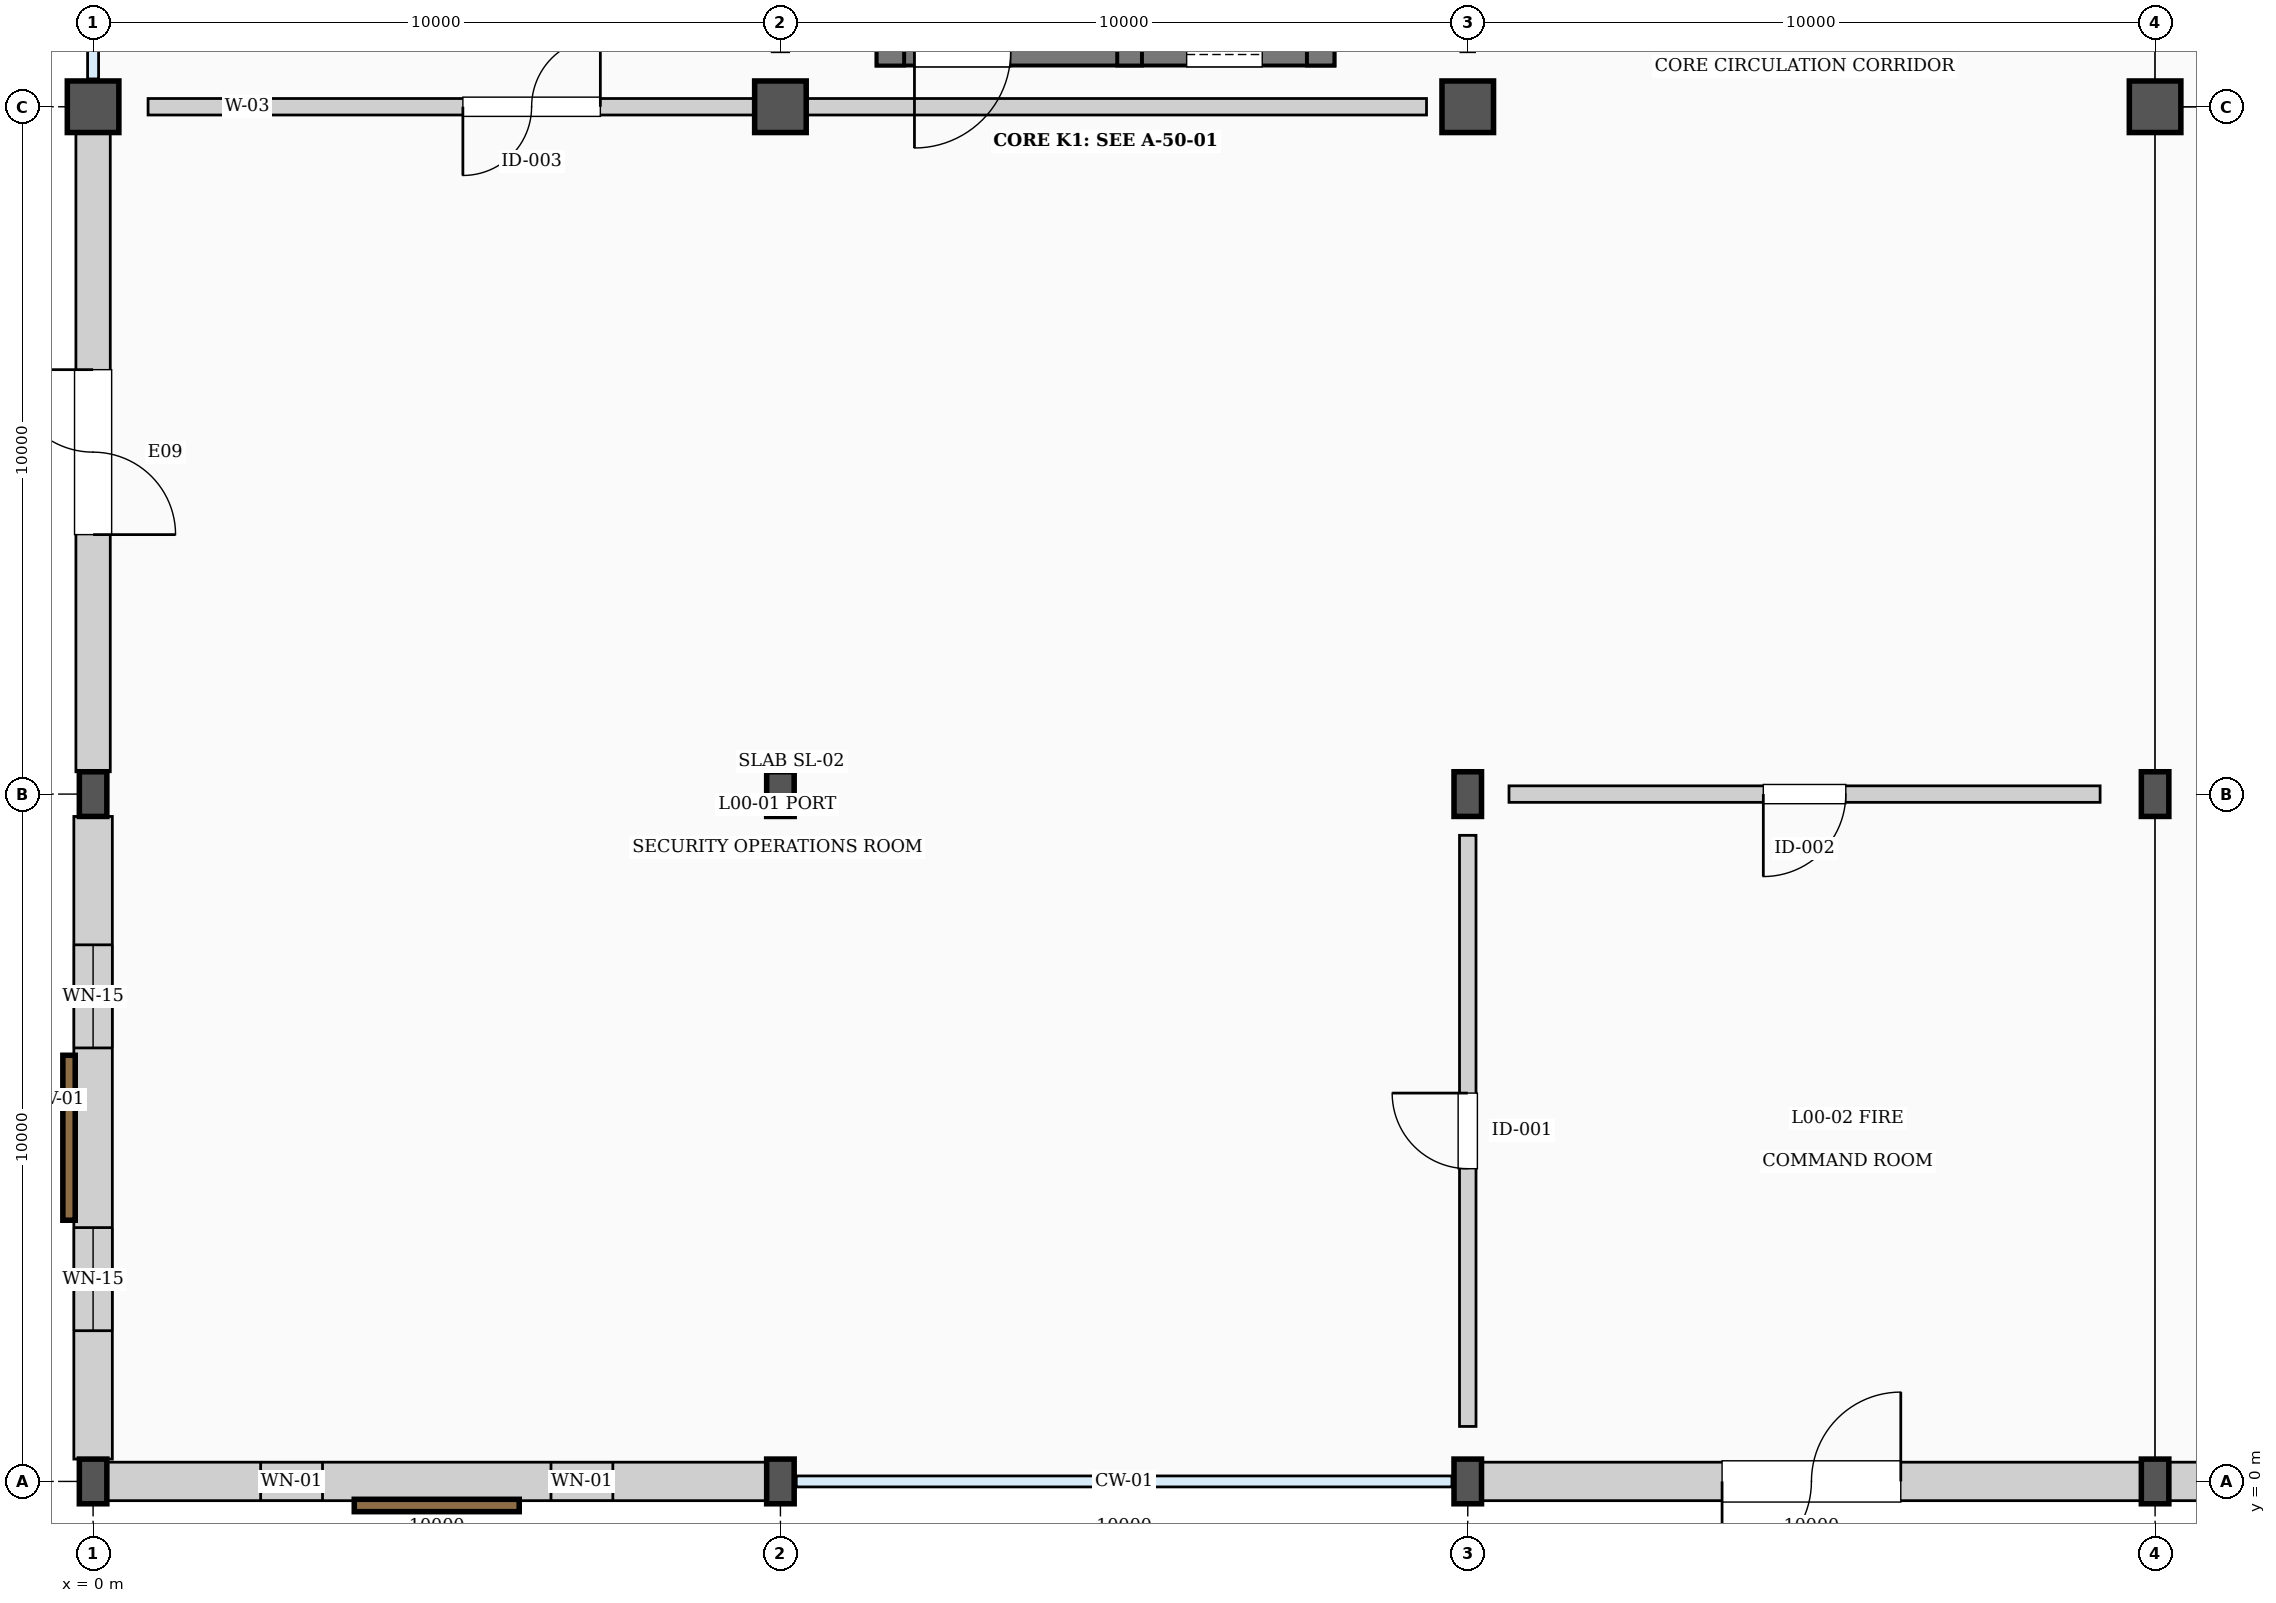
"""IFC4 building model, lengths in metres.
Left out: names, types, materials, properties, quantities, classifications, styles, units other than length and angle.
Written with IfcOpenShell. Run it as: python <this file> out.ifc"""

import sys

from ifc_helpers import new_model, si_unit, direction, frame, frame_2d, origin, origin_2d, place, context, subcontext, project, spatial, rectangle, extrude, element, fill, save


model = new_model("IFC4")
c1 = context("Model", 3, precision=1e-05, world=origin(), true_north=direction((0.0, 1.0)))
c2 = subcontext(c1, "Body", "Model", "MODEL_VIEW")
j1 = project(units=[si_unit("LENGTHUNIT", "METRE"), si_unit("PLANEANGLEUNIT", "RADIAN")], contexts=[c1])
p1 = place(None, origin())
s1 = spatial("IfcSite", under=j1, at=p1, CompositionType="ELEMENT")
p2 = place(p1, origin())
s2 = spatial("IfcBuilding", under=s1, at=p2, CompositionType="ELEMENT")
p3 = place(p2, origin())
s3 = spatial("IfcBuildingStorey", under=s2, at=p3, CompositionType="ELEMENT", Elevation=0.0)
for number, where, z_axis, x_axis in (
    (1, (0.0, 0.0, 0.0), (0.0, 0.0, 1.0), (1.0, 0.0, 0.0)),
    (2, (0.0, 10.0, 0.0), (0.0, 0.0, 1.0), (1.0, 0.0, 0.0)),
):
    element("IfcColumn", number, at=place(p3, frame(where, z_axis=z_axis, x_axis=x_axis)), inside=s3, PredefinedType="COLUMN", context=c2, shape_type="SweptSolid", body=[
        extrude(rectangle(XDim=0.4, YDim=0.65, at=origin_2d()), origin(), (0.0, 0.0, 1.0), 5.4),
    ])
p4 = place(p3, frame((0.0, 20.0, 0.0), z_axis=(0.0, 0.0, 1.0), x_axis=(1.0, 0.0, 0.0)))
e3 = element("IfcColumn", 3, at=p4, inside=s3, PredefinedType="COLUMN", context=c2, shape_type="SweptSolid", body=[
    extrude(rectangle(XDim=0.75, YDim=0.75, at=origin_2d()), origin(), (0.0, 0.0, 1.0), 5.4),
])
for number, where, z_axis, x_axis in (
    (4, (10.0, 0.0, 0.0), (0.0, 0.0, 1.0), (1.0, 0.0, 0.0)),
    (5, (10.0, 10.0, 0.0), (0.0, 0.0, 1.0), (1.0, 0.0, 0.0)),
):
    element("IfcColumn", number, at=place(p3, frame(where, z_axis=z_axis, x_axis=x_axis)), inside=s3, PredefinedType="COLUMN", context=c2, shape_type="SweptSolid", body=[
        extrude(rectangle(XDim=0.4, YDim=0.65, at=origin_2d()), origin(), (0.0, 0.0, 1.0), 5.4),
    ])
p5 = place(p3, frame((10.0, 20.0, 0.0), z_axis=(0.0, 0.0, 1.0), x_axis=(1.0, 0.0, 0.0)))
e6 = element("IfcColumn", 6, at=p5, inside=s3, PredefinedType="COLUMN", context=c2, shape_type="SweptSolid", body=[
    extrude(rectangle(XDim=0.75, YDim=0.75, at=origin_2d()), origin(), (0.0, 0.0, 1.0), 5.4),
])
for number, where, z_axis, x_axis in (
    (7, (20.0, 0.0, 0.0), (0.0, 0.0, 1.0), (1.0, 0.0, 0.0)),
    (8, (20.0, 10.0, 0.0), (0.0, 0.0, 1.0), (1.0, 0.0, 0.0)),
):
    element("IfcColumn", number, at=place(p3, frame(where, z_axis=z_axis, x_axis=x_axis)), inside=s3, PredefinedType="COLUMN", context=c2, shape_type="SweptSolid", body=[
        extrude(rectangle(XDim=0.4, YDim=0.65, at=origin_2d()), origin(), (0.0, 0.0, 1.0), 5.4),
    ])
p6 = place(p3, frame((20.0, 20.0, 0.0), z_axis=(0.0, 0.0, 1.0), x_axis=(1.0, 0.0, 0.0)))
e9 = element("IfcColumn", 9, at=p6, inside=s3, PredefinedType="COLUMN", context=c2, shape_type="SweptSolid", body=[
    extrude(rectangle(XDim=0.75, YDim=0.75, at=origin_2d()), origin(), (0.0, 0.0, 1.0), 5.4),
])
for number, where, z_axis, x_axis in (
    (10, (30.0, 0.0, 0.0), (0.0, 0.0, 1.0), (1.0, 0.0, 0.0)),
    (11, (30.0, 10.0, 0.0), (0.0, 0.0, 1.0), (1.0, 0.0, 0.0)),
):
    element("IfcColumn", number, at=place(p3, frame(where, z_axis=z_axis, x_axis=x_axis)), inside=s3, PredefinedType="COLUMN", context=c2, shape_type="SweptSolid", body=[
        extrude(rectangle(XDim=0.4, YDim=0.65, at=origin_2d()), origin(), (0.0, 0.0, 1.0), 5.4),
    ])
p7 = place(p3, frame((30.0, 20.0, 0.0), z_axis=(0.0, 0.0, 1.0), x_axis=(1.0, 0.0, 0.0)))
e12 = element("IfcColumn", 12, at=p7, inside=s3, PredefinedType="COLUMN", context=c2, shape_type="SweptSolid", body=[
    extrude(rectangle(XDim=0.75, YDim=0.75, at=origin_2d()), origin(), (0.0, 0.0, 1.0), 5.4),
])
p8 = place(p3, frame((0.2, 0.0, 0.0), z_axis=(0.0, 0.0, 1.0), x_axis=(1.0, 0.0, 0.0)))
e13 = element("IfcWall", 13, at=p8, inside=s3, PredefinedType="SOLIDWALL", context=c2, shape_type="SweptSolid", body=[
    extrude(rectangle(XDim=9.6, YDim=0.56, at=frame_2d((4.8, 0.0))), origin(), (0.0, 0.0, 1.0), 4.6),
])
p9 = place(p8, frame((2.238, 0.0, 0.9)))
e14 = element("IfcOpeningElement", 14, at=p9, cuts=e13, PredefinedType="OPENING", context=c2, shape_type="SweptSolid", body=[
    extrude(rectangle(XDim=0.9, YDim=1.5, at=frame_2d((0.45, 0.75))), frame((0.0, 0.29, 0.0), z_axis=(0.0, -1.0, 0.0), x_axis=(1.0, 0.0, 0.0)), (0.0, 0.0, 1.0), 0.58),
])
p10 = place(p8, frame((6.462, 0.0, 0.9)))
e15 = element("IfcOpeningElement", 15, at=p10, cuts=e13, PredefinedType="OPENING", context=c2, shape_type="SweptSolid", body=[
    extrude(rectangle(XDim=0.9, YDim=1.5, at=frame_2d((0.45, 0.75))), frame((0.0, 0.29, 0.0), z_axis=(0.0, -1.0, 0.0), x_axis=(1.0, 0.0, 0.0)), (0.0, 0.0, 1.0), 0.58),
])
p11 = place(p3, frame((20.2, 0.0, 0.0), z_axis=(0.0, 0.0, 1.0), x_axis=(1.0, 0.0, 0.0)))
e16 = element("IfcWall", 16, at=p11, inside=s3, PredefinedType="SOLIDWALL", context=c2, shape_type="SweptSolid", body=[
    extrude(rectangle(XDim=9.6, YDim=0.56, at=frame_2d((4.8, 0.0))), origin(), (0.0, 0.0, 1.0), 4.58),
])
p12 = place(p11, frame((3.5, 0.0, 0.0)))
e17 = element("IfcOpeningElement", 17, at=p12, cuts=e16, PredefinedType="OPENING", context=c2, shape_type="SweptSolid", body=[
    extrude(rectangle(XDim=2.6, YDim=2.6, at=frame_2d((1.3, 1.3))), frame((0.0, 0.29, 0.0), z_axis=(0.0, -1.0, 0.0), x_axis=(1.0, 0.0, 0.0)), (0.0, 0.0, 1.0), 0.58),
])
p13 = place(p3, frame((30.2, 0.0, 0.0), z_axis=(0.0, 0.0, 1.0), x_axis=(1.0, 0.0, 0.0)))
e18 = element("IfcWall", 18, at=p13, inside=s3, PredefinedType="SOLIDWALL", context=c2, shape_type="SweptSolid", body=[
    extrude(rectangle(XDim=9.6, YDim=0.56, at=frame_2d((4.8, 0.0))), origin(), (0.0, 0.0, 1.0), 4.58),
])
p14 = place(p13, frame((6.1, 0.0, 0.0)))
e19 = element("IfcOpeningElement", 19, at=p14, cuts=e18, PredefinedType="OPENING", context=c2, shape_type="SweptSolid", body=[
    extrude(rectangle(XDim=2.6, YDim=2.6, at=frame_2d((1.3, 1.3))), frame((0.0, 0.29, 0.0), z_axis=(0.0, -1.0, 0.0), x_axis=(1.0, 0.0, 0.0)), (0.0, 0.0, 1.0), 0.58),
])
p15 = place(p3, frame((0.0, 0.325, 0.0), z_axis=(0.0, 0.0, 1.0), x_axis=(0.0, 1.0, 0.0)))
e20 = element("IfcWall", 20, at=p15, inside=s3, PredefinedType="SOLIDWALL", context=c2, shape_type="SweptSolid", body=[
    extrude(rectangle(XDim=9.35, YDim=0.56, at=frame_2d((4.675, 0.0))), origin(), (0.0, 0.0, 1.0), 4.75),
])
p16 = place(p15, frame((1.868, 0.0, 0.9)))
e21 = element("IfcOpeningElement", 21, at=p16, cuts=e20, PredefinedType="OPENING", context=c2, shape_type="SweptSolid", body=[
    extrude(rectangle(XDim=1.5, YDim=2.7, at=frame_2d((0.75, 1.35))), frame((0.0, 0.29, 0.0), z_axis=(0.0, -1.0, 0.0), x_axis=(1.0, 0.0, 0.0)), (0.0, 0.0, 1.0), 0.58),
])
p17 = place(p15, frame((5.982, 0.0, 0.9)))
e22 = element("IfcOpeningElement", 22, at=p17, cuts=e20, PredefinedType="OPENING", context=c2, shape_type="SweptSolid", body=[
    extrude(rectangle(XDim=1.5, YDim=2.7, at=frame_2d((0.75, 1.35))), frame((0.0, 0.29, 0.0), z_axis=(0.0, -1.0, 0.0), x_axis=(1.0, 0.0, 0.0)), (0.0, 0.0, 1.0), 0.58),
])
p18 = place(p3, frame((0.0, 10.325, 0.0), z_axis=(0.0, 0.0, 1.0), x_axis=(0.0, 1.0, 0.0)))
e23 = element("IfcWall", 23, at=p18, inside=s3, PredefinedType="SOLIDWALL", context=c2, shape_type="SweptSolid", body=[
    extrude(rectangle(XDim=9.3, YDim=0.5, at=frame_2d((4.65, 0.0))), origin(), (0.0, 0.0, 1.0), 4.69),
])
p19 = place(p18, frame((3.45, 0.0, 0.0)))
e24 = element("IfcOpeningElement", 24, at=p19, cuts=e23, PredefinedType="OPENING", context=c2, shape_type="SweptSolid", body=[
    extrude(rectangle(XDim=2.4, YDim=2.5, at=frame_2d((1.2, 1.25))), frame((0.0, 0.26, 0.0), z_axis=(0.0, -1.0, 0.0), x_axis=(1.0, 0.0, 0.0)), (0.0, 0.0, 1.0), 0.52),
])
p20 = place(p3, frame((11.4, 20.8, 0.0), z_axis=(0.0, 0.0, 1.0), x_axis=(1.0, 0.0, 0.0)))
e25 = element("IfcWall", 25, at=p20, inside=s3, PredefinedType="SHEAR", context=c2, shape_type="SweptSolid", body=[
    extrude(rectangle(XDim=6.66, YDim=0.4, at=frame_2d((3.33, 0.0))), origin(), (0.0, 0.0, 1.0), 5.4),
])
p21 = place(p20, frame((0.55, 0.0, 0.0)))
e26 = element("IfcOpeningElement", 26, at=p21, cuts=e25, PredefinedType="OPENING", context=c2, shape_type="SweptSolid", body=[
    extrude(rectangle(XDim=1.4, YDim=2.35, at=frame_2d((0.7, 1.175))), frame((0.0, 0.21, 0.0), z_axis=(0.0, -1.0, 0.0), x_axis=(1.0, 0.0, 0.0)), (0.0, 0.0, 1.0), 0.42),
])
p22 = place(p20, frame((4.51, 0.0, 0.0)))
e27 = element("IfcOpeningElement", 27, at=p22, cuts=e25, PredefinedType="OPENING", context=c2, shape_type="SweptSolid", body=[
    extrude(rectangle(XDim=1.1, YDim=2.3, at=frame_2d((0.55, 1.15))), frame((0.0, 0.21, 0.0), z_axis=(0.0, -1.0, 0.0), x_axis=(1.0, 0.0, 0.0)), (0.0, 0.0, 1.0), 0.42),
])
for number, where, z_axis, x_axis in (
    (28, (11.6, 20.6, 0.0), (0.0, 0.0, 1.0), (0.0, 1.0, 0.0)),
    (29, (17.86, 20.6, 0.0), (0.0, 0.0, 1.0), (0.0, 1.0, 0.0)),
):
    element("IfcWall", number, at=place(p3, frame(where, z_axis=z_axis, x_axis=x_axis)), inside=s3, PredefinedType="SHEAR", context=c2, shape_type="SweptSolid", body=[
        extrude(rectangle(XDim=8.8, YDim=0.4, at=frame_2d((4.4, 0.0))), origin(), (0.0, 0.0, 1.0), 5.4),
    ])
p23 = place(p3, frame((15.08, 20.6, 0.0), z_axis=(0.0, 0.0, 1.0), x_axis=(0.0, 1.0, 0.0)))
e30 = element("IfcWall", 30, at=p23, inside=s3, PredefinedType="SHEAR", context=c2, shape_type="SweptSolid", body=[
    extrude(rectangle(XDim=8.8, YDim=0.36, at=frame_2d((4.4, 0.0))), origin(), (0.0, 0.0, 1.0), 5.4),
])
p24 = place(p3, frame((20.0, 0.8, 0.0), z_axis=(0.0, 0.0, 1.0), x_axis=(0.0, 1.0, 0.0)))
e31 = element("IfcWall", 31, at=p24, inside=s3, PredefinedType="PARTITIONING", context=c2, shape_type="SweptSolid", body=[
    extrude(rectangle(XDim=8.6, YDim=0.24, at=frame_2d((4.3, 0.0))), origin(), (0.0, 0.0, 1.0), 4.55),
])
p25 = place(p24, frame((3.75, 0.0, 0.0)))
e32 = element("IfcOpeningElement", 32, at=p25, cuts=e31, PredefinedType="OPENING", context=c2, shape_type="SweptSolid", body=[
    extrude(rectangle(XDim=1.1, YDim=2.45, at=frame_2d((0.55, 1.225))), frame((0.0, 0.13, 0.0), z_axis=(0.0, -1.0, 0.0), x_axis=(1.0, 0.0, 0.0)), (0.0, 0.0, 1.0), 0.26),
])
p26 = place(p3, frame((20.6, 10.0, 0.0), z_axis=(0.0, 0.0, 1.0), x_axis=(1.0, 0.0, 0.0)))
e33 = element("IfcWall", 33, at=p26, inside=s3, PredefinedType="PARTITIONING", context=c2, shape_type="SweptSolid", body=[
    extrude(rectangle(XDim=8.6, YDim=0.24, at=frame_2d((4.3, 0.0))), origin(), (0.0, 0.0, 1.0), 4.59),
])
p27 = place(p26, frame((3.7, 0.0, 0.0)))
e34 = element("IfcOpeningElement", 34, at=p27, cuts=e33, PredefinedType="OPENING", context=c2, shape_type="SweptSolid", body=[
    extrude(rectangle(XDim=1.2, YDim=2.35, at=frame_2d((0.6, 1.175))), frame((0.0, 0.13, 0.0), z_axis=(0.0, -1.0, 0.0), x_axis=(1.0, 0.0, 0.0)), (0.0, 0.0, 1.0), 0.26),
])
p28 = place(p3, frame((0.8, 20.0, 0.0), z_axis=(0.0, 0.0, 1.0), x_axis=(1.0, 0.0, 0.0)))
e35 = element("IfcWall", 35, at=p28, inside=s3, PredefinedType="PARTITIONING", context=c2, shape_type="SweptSolid", body=[
    extrude(rectangle(XDim=18.6, YDim=0.24, at=frame_2d((9.3, 0.0))), origin(), (0.0, 0.0, 1.0), 4.54),
])
p29 = place(p28, frame((4.58, 0.0, 0.0)))
e36 = element("IfcOpeningElement", 36, at=p29, cuts=e35, PredefinedType="OPENING", context=c2, shape_type="SweptSolid", body=[
    extrude(rectangle(XDim=2.0, YDim=2.45, at=frame_2d((1.0, 1.225))), frame((0.0, 0.13, 0.0), z_axis=(0.0, -1.0, 0.0), x_axis=(1.0, 0.0, 0.0)), (0.0, 0.0, 1.0), 0.26),
])
p30 = place(p9, origin())
e37 = element("IfcWindow", 37, at=p30, inside=s3, PartitioningType="SINGLE_PANEL", PredefinedType="WINDOW", context=c2, shape_type="SweptSolid", body=[
    extrude(rectangle(XDim=0.9, YDim=1.5, at=frame_2d((0.45, 0.75))), frame((0.0, 0.03, 0.0), z_axis=(0.0, -1.0, 0.0), x_axis=(1.0, 0.0, 0.0)), (0.0, 0.0, 1.0), 0.06),
])
fill(e14, e37)
p31 = place(p10, origin())
e38 = element("IfcWindow", 38, at=p31, inside=s3, PartitioningType="SINGLE_PANEL", PredefinedType="WINDOW", context=c2, shape_type="SweptSolid", body=[
    extrude(rectangle(XDim=0.9, YDim=1.5, at=frame_2d((0.45, 0.75))), frame((0.0, 0.03, 0.0), z_axis=(0.0, -1.0, 0.0), x_axis=(1.0, 0.0, 0.0)), (0.0, 0.0, 1.0), 0.06),
])
fill(e15, e38)
p32 = place(p12, origin())
e39 = element("IfcDoor", 39, at=p32, inside=s3, OperationType="DOUBLE_DOOR_SINGLE_SWING", PredefinedType="DOOR", context=c2, shape_type="SweptSolid", body=[
    extrude(rectangle(XDim=2.6, YDim=2.6, at=frame_2d((1.3, 1.3))), frame((0.0, 0.025, 0.0), z_axis=(0.0, -1.0, 0.0), x_axis=(1.0, 0.0, 0.0)), (0.0, 0.0, 1.0), 0.05),
])
fill(e17, e39)
p33 = place(p16, origin())
e40 = element("IfcWindow", 40, at=p33, inside=s3, PartitioningType="SINGLE_PANEL", PredefinedType="WINDOW", context=c2, shape_type="SweptSolid", body=[
    extrude(rectangle(XDim=1.5, YDim=2.7, at=frame_2d((0.75, 1.35))), frame((0.0, 0.03, 0.0), z_axis=(0.0, -1.0, 0.0), x_axis=(1.0, 0.0, 0.0)), (0.0, 0.0, 1.0), 0.06),
])
fill(e21, e40)
p34 = place(p17, origin())
e41 = element("IfcWindow", 41, at=p34, inside=s3, PartitioningType="SINGLE_PANEL", PredefinedType="WINDOW", context=c2, shape_type="SweptSolid", body=[
    extrude(rectangle(XDim=1.5, YDim=2.7, at=frame_2d((0.75, 1.35))), frame((0.0, 0.03, 0.0), z_axis=(0.0, -1.0, 0.0), x_axis=(1.0, 0.0, 0.0)), (0.0, 0.0, 1.0), 0.06),
])
fill(e22, e41)
p35 = place(p19, origin())
e42 = element("IfcDoor", 42, at=p35, inside=s3, OperationType="DOUBLE_DOOR_SINGLE_SWING", PredefinedType="DOOR", context=c2, shape_type="SweptSolid", body=[
    extrude(rectangle(XDim=2.4, YDim=2.5, at=frame_2d((1.2, 1.25))), frame((0.0, 0.025, 0.0), z_axis=(0.0, -1.0, 0.0), x_axis=(1.0, 0.0, 0.0)), (0.0, 0.0, 1.0), 0.05),
])
fill(e24, e42)
p36 = place(p21, origin())
e43 = element("IfcDoor", 43, at=p36, inside=s3, OperationType="SINGLE_SWING_LEFT", PredefinedType="DOOR", context=c2, shape_type="SweptSolid", body=[
    extrude(rectangle(XDim=1.4, YDim=2.35, at=frame_2d((0.7, 1.175))), frame((0.0, 0.025, 0.0), z_axis=(0.0, -1.0, 0.0), x_axis=(1.0, 0.0, 0.0)), (0.0, 0.0, 1.0), 0.05),
])
fill(e26, e43)
p37 = place(p22, origin())
e44 = element("IfcDoor", 44, at=p37, inside=s3, OperationType="SLIDING_TO_LEFT", PredefinedType="DOOR", context=c2, shape_type="SweptSolid", body=[
    extrude(rectangle(XDim=1.1, YDim=2.3, at=frame_2d((0.55, 1.15))), frame((0.0, 0.025, 0.0), z_axis=(0.0, -1.0, 0.0), x_axis=(1.0, 0.0, 0.0)), (0.0, 0.0, 1.0), 0.05),
])
fill(e27, e44)
p38 = place(p25, origin())
e45 = element("IfcDoor", 45, at=p38, inside=s3, OperationType="SINGLE_SWING_RIGHT", PredefinedType="DOOR", context=c2, shape_type="SweptSolid", body=[
    extrude(rectangle(XDim=1.1, YDim=2.45, at=frame_2d((0.55, 1.225))), frame((0.0, 0.025, 0.0), z_axis=(0.0, -1.0, 0.0), x_axis=(1.0, 0.0, 0.0)), (0.0, 0.0, 1.0), 0.05),
])
fill(e32, e45)
p39 = place(p27, origin())
e46 = element("IfcDoor", 46, at=p39, inside=s3, OperationType="SINGLE_SWING_LEFT", PredefinedType="DOOR", context=c2, shape_type="SweptSolid", body=[
    extrude(rectangle(XDim=1.2, YDim=2.35, at=frame_2d((0.6, 1.175))), frame((0.0, 0.025, 0.0), z_axis=(0.0, -1.0, 0.0), x_axis=(1.0, 0.0, 0.0)), (0.0, 0.0, 1.0), 0.05),
])
fill(e34, e46)
p40 = place(p29, origin())
e47 = element("IfcDoor", 47, at=p40, inside=s3, OperationType="DOUBLE_DOOR_SINGLE_SWING", PredefinedType="DOOR", context=c2, shape_type="SweptSolid", body=[
    extrude(rectangle(XDim=2.0, YDim=2.45, at=frame_2d((1.0, 1.225))), frame((0.0, 0.025, 0.0), z_axis=(0.0, -1.0, 0.0), x_axis=(1.0, 0.0, 0.0)), (0.0, 0.0, 1.0), 0.05),
])
fill(e36, e47)
save(model, sys.argv[1])
